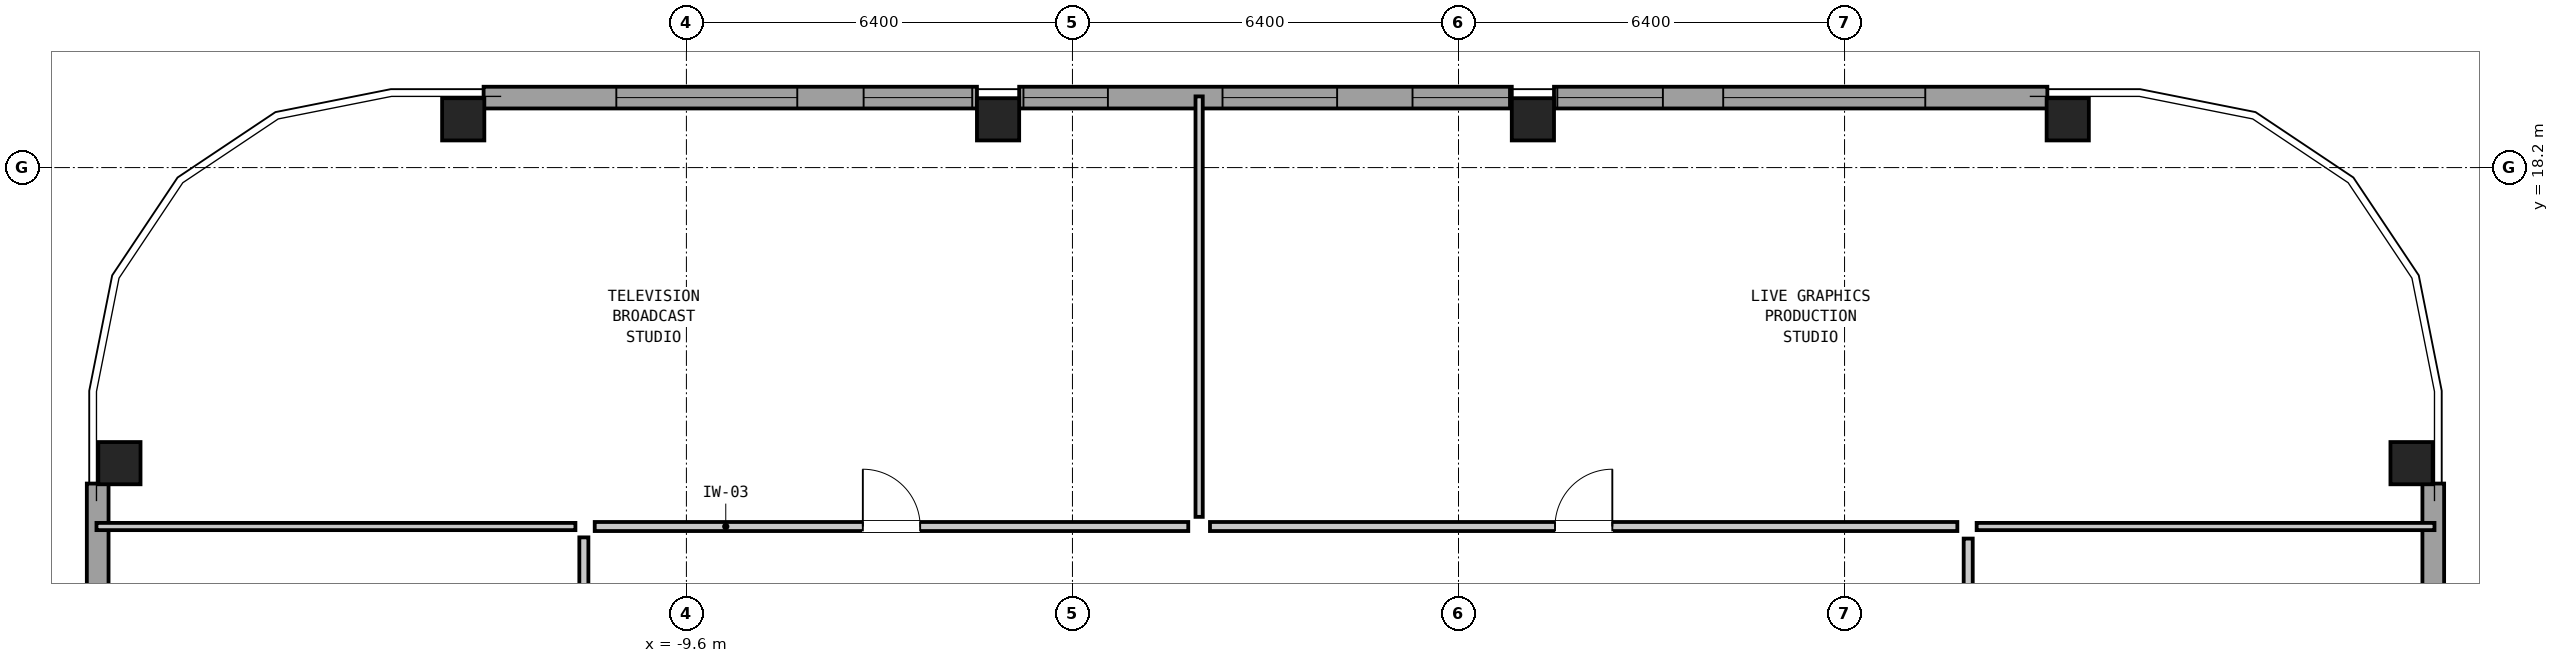
"""IFC4 building model, lengths in metres.
Left out: names, types, materials, properties, quantities, classifications, styles, units other than length and angle.
Written with IfcOpenShell. Run it as: python <this file> out.ifc"""

import sys

from ifc_helpers import new_model, si_unit, direction, frame, frame_2d, origin, origin_2d, place, context, subcontext, project, spatial, rectangle, hollow_rectangle, extrude, element, fill, save


model = new_model("IFC4")
c1 = context("Model", 3, precision=1e-05, world=origin(), true_north=direction((0.0, 1.0)))
c2 = subcontext(c1, "Body", "Model", "MODEL_VIEW")
j1 = project(units=[si_unit("LENGTHUNIT", "METRE"), si_unit("PLANEANGLEUNIT", "RADIAN")], contexts=[c1])
p1 = place(None, origin())
s1 = spatial("IfcSite", under=j1, at=p1, CompositionType="ELEMENT")
p2 = place(p1, origin())
s2 = spatial("IfcBuilding", under=s1, at=p2, CompositionType="ELEMENT")
p3 = place(p2, frame((0.0, 0.0, 202.55)))
s3 = spatial("IfcBuildingStorey", under=s2, at=p3, CompositionType="ELEMENT", Elevation=202.55)
for number, where, z_axis, x_axis in (
    (1, (19.0, 13.3, 0.0), (0.0, 0.0, 1.0), (0.0, 1.0, 0.0)),
    (2, (13.3, 19.0, 0.0), (0.0, 0.0, 1.0), (1.0, 0.0, 0.0)),
    (3, (4.433, 19.0, 0.0), (0.0, 0.0, 1.0), (1.0, 0.0, 0.0)),
    (4, (-4.433, 19.0, 0.0), (0.0, 0.0, 1.0), (1.0, 0.0, 0.0)),
    (5, (-13.3, 19.0, 0.0), (0.0, 0.0, 1.0), (1.0, 0.0, 0.0)),
    (6, (-19.0, 13.3, 0.0), (0.0, 0.0, 1.0), (0.0, 1.0, 0.0)),
):
    element("IfcColumn", number, at=place(p3, frame(where, z_axis=z_axis, x_axis=x_axis)), inside=s3, PredefinedType="COLUMN", context=c2, shape_type="SweptSolid", body=[
        extrude(hollow_rectangle(XDim=0.7, YDim=0.7, WallThickness=0.045, at=origin_2d()), origin(), (0.0, 0.0, 1.0), 3.05),
    ])
p4 = place(p3, frame((19.36, 12.962, 0.0), z_axis=(0.0, 0.0, 1.0), x_axis=(0.0, -1.0, 0.0)))
e7 = element("IfcWall", 7, at=p4, inside=s3, PredefinedType="SOLIDWALL", context=c2, shape_type="SweptSolid", body=[
    extrude(rectangle(XDim=8.179, YDim=0.36, at=frame_2d((4.089, 0.0))), origin(), (0.0, 0.0, 1.0), 2.374),
])
p5 = place(p4, frame((1.95, 0.0, 0.2)))
e8 = element("IfcOpeningElement", 8, at=p5, cuts=e7, PredefinedType="OPENING", context=c2, shape_type="SweptSolid", body=[
    extrude(rectangle(XDim=3.5, YDim=0.95, at=frame_2d((1.75, 0.475))), frame((0.0, 0.192, 0.0), z_axis=(0.0, -1.0, 0.0), x_axis=(1.0, 0.0, 0.0)), (0.0, 0.0, 1.0), 0.384),
])
p6 = place(p4, frame((6.3, 0.0, 1.15)))
e9 = element("IfcOpeningElement", 9, at=p6, cuts=e7, PredefinedType="OPENING", context=c2, shape_type="SweptSolid", body=[
    extrude(rectangle(XDim=1.8, YDim=1.05, at=frame_2d((0.9, 0.525))), frame((0.0, 0.192, 0.0), z_axis=(0.0, -1.0, 0.0), x_axis=(1.0, 0.0, 0.0)), (0.0, 0.0, 1.0), 0.384),
])
p7 = place(p3, frame((-12.962, 19.36, 0.0), z_axis=(0.0, 0.0, 1.0), x_axis=(1.0, 0.0, 0.0)))
e10 = element("IfcWall", 10, at=p7, inside=s3, PredefinedType="SOLIDWALL", context=c2, shape_type="SweptSolid", body=[
    extrude(rectangle(XDim=8.179, YDim=0.36, at=frame_2d((4.089, 0.0))), origin(), (0.0, 0.0, 1.0), 2.374),
])
p8 = place(p7, frame((2.2, 0.0, 0.2)))
e11 = element("IfcOpeningElement", 11, at=p8, cuts=e10, PredefinedType="OPENING", context=c2, shape_type="SweptSolid", body=[
    extrude(rectangle(XDim=3.0, YDim=1.0, at=frame_2d((1.5, 0.5))), frame((0.0, 0.192, 0.0), z_axis=(0.0, -1.0, 0.0), x_axis=(1.0, 0.0, 0.0)), (0.0, 0.0, 1.0), 0.384),
])
p9 = place(p7, frame((6.3, 0.0, 1.25)))
e12 = element("IfcOpeningElement", 12, at=p9, cuts=e10, PredefinedType="OPENING", context=c2, shape_type="SweptSolid", body=[
    extrude(rectangle(XDim=1.8, YDim=0.95, at=frame_2d((0.9, 0.475))), frame((0.0, 0.192, 0.0), z_axis=(0.0, -1.0, 0.0), x_axis=(1.0, 0.0, 0.0)), (0.0, 0.0, 1.0), 0.384),
])
p10 = place(p3, frame((-4.083, 19.36, 0.0), z_axis=(0.0, 0.0, 1.0), x_axis=(1.0, 0.0, 0.0)))
e13 = element("IfcWall", 13, at=p10, inside=s3, PredefinedType="SOLIDWALL", context=c2, shape_type="SweptSolid", body=[
    extrude(rectangle(XDim=8.167, YDim=0.36, at=frame_2d((4.083, 0.0))), origin(), (0.0, 0.0, 1.0), 2.374),
])
p11 = place(p10, frame((0.071, 0.0, 1.25)))
e14 = element("IfcOpeningElement", 14, at=p11, cuts=e13, PredefinedType="OPENING", context=c2, shape_type="SweptSolid", body=[
    extrude(rectangle(XDim=1.4, YDim=0.95, at=frame_2d((0.7, 0.475))), frame((0.0, 0.192, 0.0), z_axis=(0.0, -1.0, 0.0), x_axis=(1.0, 0.0, 0.0)), (0.0, 0.0, 1.0), 0.384),
])
p12 = place(p10, frame((3.371, 0.0, 0.2)))
e15 = element("IfcOpeningElement", 15, at=p12, cuts=e13, PredefinedType="OPENING", context=c2, shape_type="SweptSolid", body=[
    extrude(rectangle(XDim=1.9, YDim=1.2, at=frame_2d((0.95, 0.6))), frame((0.0, 0.192, 0.0), z_axis=(0.0, -1.0, 0.0), x_axis=(1.0, 0.0, 0.0)), (0.0, 0.0, 1.0), 0.384),
])
p13 = place(p10, frame((6.521, 0.0, 1.35)))
e16 = element("IfcOpeningElement", 16, at=p13, cuts=e13, PredefinedType="OPENING", context=c2, shape_type="SweptSolid", body=[
    extrude(rectangle(XDim=1.6, YDim=0.85, at=frame_2d((0.8, 0.425))), frame((0.0, 0.192, 0.0), z_axis=(0.0, -1.0, 0.0), x_axis=(1.0, 0.0, 0.0)), (0.0, 0.0, 1.0), 0.384),
])
p14 = place(p3, frame((4.783, 19.36, 0.0), z_axis=(0.0, 0.0, 1.0), x_axis=(1.0, 0.0, 0.0)))
e17 = element("IfcWall", 17, at=p14, inside=s3, PredefinedType="SOLIDWALL", context=c2, shape_type="SweptSolid", body=[
    extrude(rectangle(XDim=8.179, YDim=0.36, at=frame_2d((4.089, 0.0))), origin(), (0.0, 0.0, 1.0), 2.374),
])
p15 = place(p14, frame((0.055, 0.0, 1.2)))
e18 = element("IfcOpeningElement", 18, at=p15, cuts=e17, PredefinedType="OPENING", context=c2, shape_type="SweptSolid", body=[
    extrude(rectangle(XDim=1.75, YDim=1.0, at=frame_2d((0.875, 0.5))), frame((0.0, 0.192, 0.0), z_axis=(0.0, -1.0, 0.0), x_axis=(1.0, 0.0, 0.0)), (0.0, 0.0, 1.0), 0.384),
])
p16 = place(p14, frame((2.805, 0.0, 0.2)))
e19 = element("IfcOpeningElement", 19, at=p16, cuts=e17, PredefinedType="OPENING", context=c2, shape_type="SweptSolid", body=[
    extrude(rectangle(XDim=3.35, YDim=0.9, at=frame_2d((1.675, 0.45))), frame((0.0, 0.192, 0.0), z_axis=(0.0, -1.0, 0.0), x_axis=(1.0, 0.0, 0.0)), (0.0, 0.0, 1.0), 0.384),
])
p17 = place(p3, frame((-19.36, 4.783, 0.0), z_axis=(0.0, 0.0, 1.0), x_axis=(0.0, 1.0, 0.0)))
e20 = element("IfcWall", 20, at=p17, inside=s3, PredefinedType="SOLIDWALL", context=c2, shape_type="SweptSolid", body=[
    extrude(rectangle(XDim=8.179, YDim=0.36, at=frame_2d((4.089, 0.0))), origin(), (0.0, 0.0, 1.0), 2.374),
])
p18 = place(p17, frame((0.055, 0.0, 1.1)))
e21 = element("IfcOpeningElement", 21, at=p18, cuts=e20, PredefinedType="OPENING", context=c2, shape_type="SweptSolid", body=[
    extrude(rectangle(XDim=1.75, YDim=1.1, at=frame_2d((0.875, 0.55))), frame((0.0, 0.192, 0.0), z_axis=(0.0, -1.0, 0.0), x_axis=(1.0, 0.0, 0.0)), (0.0, 0.0, 1.0), 0.384),
])
p19 = place(p17, frame((2.805, 0.0, 0.2)))
e22 = element("IfcOpeningElement", 22, at=p19, cuts=e20, PredefinedType="OPENING", context=c2, shape_type="SweptSolid", body=[
    extrude(rectangle(XDim=3.35, YDim=1.0, at=frame_2d((1.675, 0.5))), frame((0.0, 0.192, 0.0), z_axis=(0.0, -1.0, 0.0), x_axis=(1.0, 0.0, 0.0)), (0.0, 0.0, 1.0), 0.384),
])
p20 = place(p3, frame((-19.38, 12.25, 0.0), z_axis=(0.0, 0.0, 1.0), x_axis=(1.0, 0.0, 0.0)))
e23 = element("IfcWall", 23, at=p20, inside=s3, PredefinedType="PARTITIONING", context=c2, shape_type="SweptSolid", body=[
    extrude(rectangle(XDim=7.94, YDim=0.12, at=frame_2d((3.97, 0.0))), origin(), (0.0, 0.0, 1.0), 2.86),
])
p21 = place(p3, frame((11.79, 12.25, 0.0), z_axis=(0.0, 0.0, 1.0), x_axis=(1.0, 0.0, 0.0)))
e24 = element("IfcWall", 24, at=p21, inside=s3, PredefinedType="PARTITIONING", context=c2, shape_type="SweptSolid", body=[
    extrude(rectangle(XDim=7.59, YDim=0.12, at=frame_2d((3.795, 0.0))), origin(), (0.0, 0.0, 1.0), 2.86),
])
p22 = place(p3, frame((-1.1, 12.41, 0.0), z_axis=(0.0, 0.0, 1.0), x_axis=(0.0, 1.0, 0.0)))
e25 = element("IfcWall", 25, at=p22, inside=s3, PredefinedType="PARTITIONING", context=c2, shape_type="SweptSolid", body=[
    extrude(rectangle(XDim=6.97, YDim=0.12, at=frame_2d((3.485, 0.0))), origin(), (0.0, 0.0, 1.0), 2.86),
])
p23 = place(p3, frame((-11.12, 12.25, 0.0), z_axis=(0.0, 0.0, 1.0), x_axis=(1.0, 0.0, 0.0)))
e26 = element("IfcWall", 26, at=p23, inside=s3, PredefinedType="PARTITIONING", context=c2, shape_type="SweptSolid", body=[
    extrude(rectangle(XDim=9.84, YDim=0.15, at=frame_2d((4.92, 0.0))), origin(), (0.0, 0.0, 1.0), 2.86),
])
p24 = place(p23, frame((4.445, 0.0, 0.0)))
e27 = element("IfcOpeningElement", 27, at=p24, cuts=e26, PredefinedType="OPENING", context=c2, shape_type="SweptSolid", body=[
    extrude(rectangle(XDim=0.95, YDim=2.1, at=frame_2d((0.475, 1.05))), frame((0.0, 0.087, 0.0), z_axis=(0.0, -1.0, 0.0), x_axis=(1.0, 0.0, 0.0)), (0.0, 0.0, 1.0), 0.174),
])
p25 = place(p3, frame((-0.92, 12.25, 0.0), z_axis=(0.0, 0.0, 1.0), x_axis=(1.0, 0.0, 0.0)))
e28 = element("IfcWall", 28, at=p25, inside=s3, PredefinedType="PARTITIONING", context=c2, shape_type="SweptSolid", body=[
    extrude(rectangle(XDim=12.39, YDim=0.15, at=frame_2d((6.195, 0.0))), origin(), (0.0, 0.0, 1.0), 2.86),
])
p26 = place(p25, frame((5.72, 0.0, 0.0)))
e29 = element("IfcOpeningElement", 29, at=p26, cuts=e28, PredefinedType="OPENING", context=c2, shape_type="SweptSolid", body=[
    extrude(rectangle(XDim=0.95, YDim=2.1, at=frame_2d((0.475, 1.05))), frame((0.0, 0.087, 0.0), z_axis=(0.0, -1.0, 0.0), x_axis=(1.0, 0.0, 0.0)), (0.0, 0.0, 1.0), 0.174),
])
p27 = place(p3, frame((-11.3, -10.87, 0.0), z_axis=(0.0, 0.0, 1.0), x_axis=(0.0, 1.0, 0.0)))
e30 = element("IfcWall", 30, at=p27, inside=s3, PredefinedType="PARTITIONING", context=c2, shape_type="SweptSolid", body=[
    extrude(rectangle(XDim=22.94, YDim=0.15, at=frame_2d((11.47, 0.0))), origin(), (0.0, 0.0, 1.0), 2.86),
])
p28 = place(p27, frame((10.995, 0.0, 0.0)))
e31 = element("IfcOpeningElement", 31, at=p28, cuts=e30, PredefinedType="OPENING", context=c2, shape_type="SweptSolid", body=[
    extrude(rectangle(XDim=0.95, YDim=2.1, at=frame_2d((0.475, 1.05))), frame((0.0, 0.087, 0.0), z_axis=(0.0, -1.0, 0.0), x_axis=(1.0, 0.0, 0.0)), (0.0, 0.0, 1.0), 0.174),
])
p29 = place(p3, frame((11.65, 3.8, 0.0), z_axis=(0.0, 0.0, 1.0), x_axis=(0.0, 1.0, 0.0)))
e32 = element("IfcWall", 32, at=p29, inside=s3, PredefinedType="PARTITIONING", context=c2, shape_type="SweptSolid", body=[
    extrude(rectangle(XDim=8.25, YDim=0.15, at=frame_2d((4.125, 0.0))), origin(), (0.0, 0.0, 1.0), 2.86),
])
p30 = place(p29, frame((3.65, 0.0, 0.0)))
e33 = element("IfcOpeningElement", 33, at=p30, cuts=e32, PredefinedType="OPENING", context=c2, shape_type="SweptSolid", body=[
    extrude(rectangle(XDim=0.95, YDim=2.1, at=frame_2d((0.475, 1.05))), frame((0.0, 0.087, 0.0), z_axis=(0.0, -1.0, 0.0), x_axis=(1.0, 0.0, 0.0)), (0.0, 0.0, 1.0), 0.174),
])
p31 = place(p8, origin())
e34 = element("IfcWindow", 34, at=p31, inside=s3, PartitioningType="SINGLE_PANEL", PredefinedType="WINDOW", context=c2, shape_type="SweptSolid", body=[
    extrude(rectangle(XDim=3.0, YDim=1.0, at=frame_2d((1.5, 0.5))), frame((0.0, 0.03, 0.0), z_axis=(0.0, -1.0, 0.0), x_axis=(1.0, 0.0, 0.0)), (0.0, 0.0, 1.0), 0.06),
])
fill(e11, e34)
p32 = place(p9, origin())
e35 = element("IfcWindow", 35, at=p32, inside=s3, PartitioningType="SINGLE_PANEL", PredefinedType="WINDOW", context=c2, shape_type="SweptSolid", body=[
    extrude(rectangle(XDim=1.8, YDim=0.95, at=frame_2d((0.9, 0.475))), frame((0.0, 0.03, 0.0), z_axis=(0.0, -1.0, 0.0), x_axis=(1.0, 0.0, 0.0)), (0.0, 0.0, 1.0), 0.06),
])
fill(e12, e35)
p33 = place(p11, origin())
e36 = element("IfcWindow", 36, at=p33, inside=s3, PartitioningType="SINGLE_PANEL", PredefinedType="WINDOW", context=c2, shape_type="SweptSolid", body=[
    extrude(rectangle(XDim=1.4, YDim=0.95, at=frame_2d((0.7, 0.475))), frame((0.0, 0.03, 0.0), z_axis=(0.0, -1.0, 0.0), x_axis=(1.0, 0.0, 0.0)), (0.0, 0.0, 1.0), 0.06),
])
fill(e14, e36)
p34 = place(p12, origin())
e37 = element("IfcWindow", 37, at=p34, inside=s3, PartitioningType="SINGLE_PANEL", PredefinedType="WINDOW", context=c2, shape_type="SweptSolid", body=[
    extrude(rectangle(XDim=1.9, YDim=1.2, at=frame_2d((0.95, 0.6))), frame((0.0, 0.03, 0.0), z_axis=(0.0, -1.0, 0.0), x_axis=(1.0, 0.0, 0.0)), (0.0, 0.0, 1.0), 0.06),
])
fill(e15, e37)
p35 = place(p13, origin())
e38 = element("IfcWindow", 38, at=p35, inside=s3, PartitioningType="SINGLE_PANEL", PredefinedType="WINDOW", context=c2, shape_type="SweptSolid", body=[
    extrude(rectangle(XDim=1.6, YDim=0.85, at=frame_2d((0.8, 0.425))), frame((0.0, 0.03, 0.0), z_axis=(0.0, -1.0, 0.0), x_axis=(1.0, 0.0, 0.0)), (0.0, 0.0, 1.0), 0.06),
])
fill(e16, e38)
p36 = place(p15, origin())
e39 = element("IfcWindow", 39, at=p36, inside=s3, PartitioningType="SINGLE_PANEL", PredefinedType="WINDOW", context=c2, shape_type="SweptSolid", body=[
    extrude(rectangle(XDim=1.75, YDim=1.0, at=frame_2d((0.875, 0.5))), frame((0.0, 0.03, 0.0), z_axis=(0.0, -1.0, 0.0), x_axis=(1.0, 0.0, 0.0)), (0.0, 0.0, 1.0), 0.06),
])
fill(e18, e39)
p37 = place(p16, origin())
e40 = element("IfcWindow", 40, at=p37, inside=s3, PartitioningType="SINGLE_PANEL", PredefinedType="WINDOW", context=c2, shape_type="SweptSolid", body=[
    extrude(rectangle(XDim=3.35, YDim=0.9, at=frame_2d((1.675, 0.45))), frame((0.0, 0.03, 0.0), z_axis=(0.0, -1.0, 0.0), x_axis=(1.0, 0.0, 0.0)), (0.0, 0.0, 1.0), 0.06),
])
fill(e19, e40)
p38 = place(p24, origin())
e41 = element("IfcDoor", 41, at=p38, inside=s3, OperationType="SINGLE_SWING_LEFT", PredefinedType="DOOR", context=c2, shape_type="SweptSolid", body=[
    extrude(rectangle(XDim=0.95, YDim=2.1, at=frame_2d((0.475, 1.05))), frame((0.0, 0.025, 0.0), z_axis=(0.0, -1.0, 0.0), x_axis=(1.0, 0.0, 0.0)), (0.0, 0.0, 1.0), 0.05),
])
fill(e27, e41)
p39 = place(p26, origin())
e42 = element("IfcDoor", 42, at=p39, inside=s3, OperationType="SINGLE_SWING_RIGHT", PredefinedType="DOOR", context=c2, shape_type="SweptSolid", body=[
    extrude(rectangle(XDim=0.95, YDim=2.1, at=frame_2d((0.475, 1.05))), frame((0.0, 0.025, 0.0), z_axis=(0.0, -1.0, 0.0), x_axis=(1.0, 0.0, 0.0)), (0.0, 0.0, 1.0), 0.05),
])
fill(e29, e42)
save(model, sys.argv[1])
